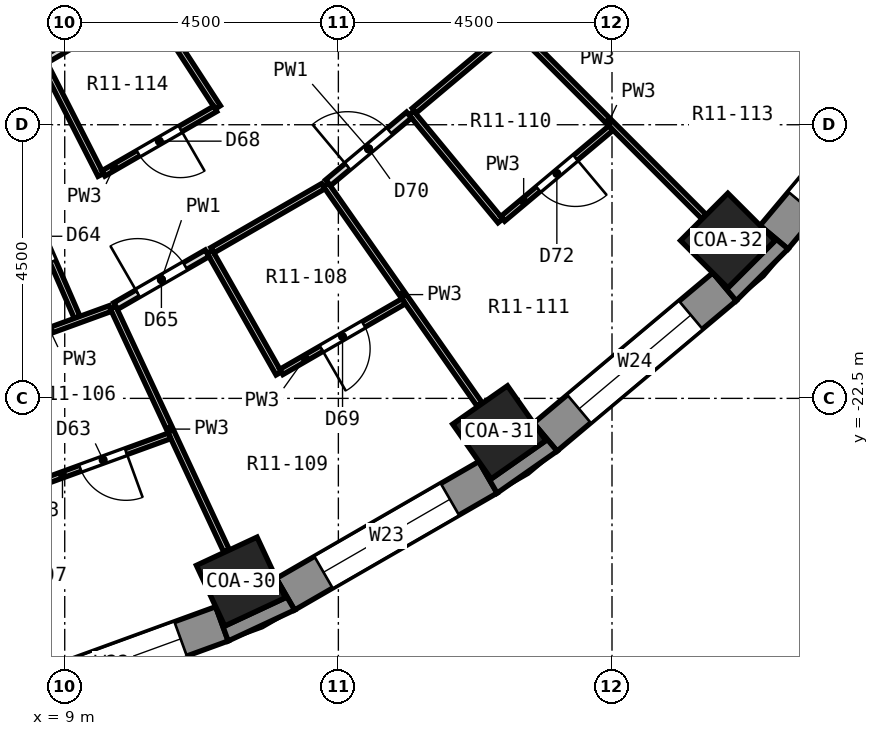
"""IFC4 building model, lengths in metres.
Left out: names, types, materials, properties, quantities, classifications, styles, units other than length and angle.
Written with IfcOpenShell. Run it as: python <this file> out.ifc"""

import sys

from ifc_helpers import new_model, si_unit, direction, frame, frame_2d, origin, origin_2d, place, context, subcontext, project, spatial, polyline, rectangle, outline, extrude, element, fill, save


model = new_model("IFC4")
c1 = context("Model", 3, precision=1e-05, world=origin(), true_north=direction((0.0, 1.0)))
c2 = subcontext(c1, "Body", "Model", "MODEL_VIEW")
j1 = project(units=[si_unit("LENGTHUNIT", "METRE"), si_unit("PLANEANGLEUNIT", "RADIAN")], contexts=[c1])
p1 = place(None, origin())
s1 = spatial("IfcSite", under=j1, at=p1, CompositionType="ELEMENT")
p2 = place(p1, origin())
s2 = spatial("IfcBuilding", under=s1, at=p2, CompositionType="ELEMENT")
p3 = place(p2, frame((0.0, 0.0, 46.1)))
s3 = spatial("IfcBuildingStorey", under=s2, at=p3, CompositionType="ELEMENT", Elevation=46.1)
for number, where, z_axis, x_axis in (
    (1, (11.897, -25.512, 0.0), (0.0, 0.0, 1.0), (0.423, -0.906, 0.0)),
    (2, (16.146, -23.059, 0.0), (0.0, 0.0, 1.0), (0.574, -0.819, 0.0)),
    (3, (19.905, -19.905, 0.0), (0.0, 0.0, 1.0), (0.707, -0.707, 0.0)),
):
    element("IfcColumn", number, at=place(p3, frame(where, z_axis=z_axis, x_axis=x_axis)), inside=s3, PredefinedType="COLUMN", context=c2, shape_type="SweptSolid", body=[
        extrude(rectangle(XDim=1.1, YDim=1.1, at=origin_2d()), origin(), (0.0, 0.0, 1.0), 3.3),
    ])
p4 = place(p3, frame((7.971, -27.523, 0.0), z_axis=(0.0, 0.0, 1.0), x_axis=(0.939689588564, 0.342028474173, 0.0)))
e4 = element("IfcWall", 4, at=p4, inside=s3, PredefinedType="SOLIDWALL", context=c2, shape_type="SweptSolid", body=[
    extrude(rectangle(XDim=3.846, YDim=0.6, at=frame_2d((1.923, 0.0))), origin(), (0.0, 0.0, 1.0), 2.75),
])
p5 = place(p4, frame((0.723, 0.0, 0.9)))
e5 = element("IfcOpeningElement", 5, at=p5, cuts=e4, PredefinedType="OPENING", context=c2, shape_type="SweptSolid", body=[
    extrude(rectangle(XDim=2.4, YDim=1.8, at=frame_2d((1.2, 0.9))), frame((0.0, 0.312, 0.0), z_axis=(0.0, -1.0, 0.0), x_axis=(1.0, 0.0, 0.0)), (0.0, 0.0, 1.0), 0.624),
])
p6 = place(p3, frame((12.63, -25.721, 0.0), z_axis=(0.0, 0.0, 1.0), x_axis=(0.86603124159, 0.499989888488, 0.0)))
e6 = element("IfcWall", 6, at=p6, inside=s3, PredefinedType="SOLIDWALL", context=c2, shape_type="SweptSolid", body=[
    extrude(rectangle(XDim=3.846, YDim=0.6, at=frame_2d((1.923, 0.0))), origin(), (0.0, 0.0, 1.0), 2.75),
])
p7 = place(p6, frame((0.723, 0.0, 0.9)))
e7 = element("IfcOpeningElement", 7, at=p7, cuts=e6, PredefinedType="OPENING", context=c2, shape_type="SweptSolid", body=[
    extrude(rectangle(XDim=2.4, YDim=1.8, at=frame_2d((1.2, 0.9))), frame((0.0, 0.312, 0.0), z_axis=(0.0, -1.0, 0.0), x_axis=(1.0, 0.0, 0.0)), (0.0, 0.0, 1.0), 0.624),
])
p8 = place(p3, frame((16.904, -23.137, 0.0), z_axis=(0.0, 0.0, 1.0), x_axis=(0.766026164483, 0.642809392687, 0.0)))
e8 = element("IfcWall", 8, at=p8, inside=s3, PredefinedType="SOLIDWALL", context=c2, shape_type="SweptSolid", body=[
    extrude(rectangle(XDim=3.846, YDim=0.6, at=frame_2d((1.923, 0.0))), origin(), (0.0, 0.0, 1.0), 2.75),
])
p9 = place(p8, frame((0.723, 0.0, 0.9)))
e9 = element("IfcOpeningElement", 9, at=p9, cuts=e8, PredefinedType="OPENING", context=c2, shape_type="SweptSolid", body=[
    extrude(rectangle(XDim=2.4, YDim=1.8, at=frame_2d((1.2, 0.9))), frame((0.0, 0.312, 0.0), z_axis=(0.0, -1.0, 0.0), x_axis=(1.0, 0.0, 0.0)), (0.0, 0.0, 1.0), 0.624),
])
p10 = place(p3, frame((20.665, -19.85, 0.0), z_axis=(0.0, 0.0, 1.0), x_axis=(0.642809392687, 0.766026164483, 0.0)))
e10 = element("IfcWall", 10, at=p10, inside=s3, PredefinedType="SOLIDWALL", context=c2, shape_type="SweptSolid", body=[
    extrude(rectangle(XDim=3.846, YDim=0.6, at=frame_2d((1.923, 0.0))), origin(), (0.0, 0.0, 1.0), 2.75),
])
p11 = place(p10, frame((0.723, 0.0, 0.9)))
e11 = element("IfcOpeningElement", 11, at=p11, cuts=e10, PredefinedType="OPENING", context=c2, shape_type="SweptSolid", body=[
    extrude(rectangle(XDim=2.4, YDim=1.8, at=frame_2d((1.2, 0.9))), frame((0.0, 0.312, 0.0), z_axis=(0.0, -1.0, 0.0), x_axis=(1.0, 0.0, 0.0)), (0.0, 0.0, 1.0), 0.624),
])
p12 = place(p3, origin())
e12 = element("IfcWall", 12, at=p12, inside=s3, PredefinedType="SOLIDWALL", context=c2, shape_type="SweptSolid", body=[
    extrude(outline(polyline([(12.78, -25.981), (12.479, -25.461), (12.628, -25.779), (11.631, -26.243), (11.483, -25.926), (11.688, -26.49), (12.78, -25.981)])), origin(), (0.0, 0.0, 1.0), 2.75),
])
p13 = place(p3, origin())
e13 = element("IfcWall", 13, at=p13, inside=s3, PredefinedType="SOLIDWALL", context=c2, shape_type="SweptSolid", body=[
    extrude(outline(polyline([(16.11, -24.058), (17.097, -23.367), (16.711, -22.907), (16.912, -23.194), (16.011, -23.825), (15.81, -23.538), (16.11, -24.058)])), origin(), (0.0, 0.0, 1.0), 2.75),
])
p14 = place(p3, origin())
e14 = element("IfcWall", 14, at=p14, inside=s3, PredefinedType="SOLIDWALL", context=c2, shape_type="SweptSolid", body=[
    extrude(outline(polyline([(20.895, -20.043), (20.435, -19.657), (20.683, -19.905), (19.905, -20.683), (19.657, -20.435), (20.043, -20.895), (20.895, -20.043)])), origin(), (0.0, 0.0, 1.0), 2.75),
])
p15 = place(p3, frame((7.65, -17.594, 0.0), z_axis=(0.0, 0.0, 1.0), x_axis=(0.398813158587, -0.917032204744, 0.0)))
e15 = element("IfcWall", 15, at=p15, inside=s3, PredefinedType="PARTITIONING", context=c2, shape_type="SweptSolid", body=[
    extrude(rectangle(XDim=3.897, YDim=0.1, at=frame_2d((1.948, 0.0))), origin(), (0.0, 0.0, 1.0), 2.75),
])
p16 = place(p15, frame((1.992, 0.0, 0.0)))
e16 = element("IfcOpeningElement", 16, at=p16, cuts=e15, PredefinedType="OPENING", context=c2, shape_type="SweptSolid", body=[
    extrude(rectangle(XDim=0.9, YDim=2.1, at=frame_2d((0.45, 1.05))), frame((0.0, 0.062, 0.0), z_axis=(0.0, -1.0, 0.0), x_axis=(1.0, 0.0, 0.0)), (0.0, 0.0, 1.0), 0.124),
])
p17 = place(p3, frame((9.795, -21.006, 0.0), z_axis=(0.0, 0.0, 1.0), x_axis=(0.422658280027, -0.906289125127, 0.0)))
e17 = element("IfcWall", 17, at=p17, inside=s3, PredefinedType="PARTITIONING", context=c2, shape_type="SweptSolid", body=[
    extrude(rectangle(XDim=4.413, YDim=0.1, at=frame_2d((2.206, 0.0))), origin(), (0.0, 0.0, 1.0), 2.75),
])
p18 = place(p3, frame((8.667, -17.008, 0.0), z_axis=(0.0, 0.0, 1.0), x_axis=(0.453664033068, -0.891172791944, 0.0)))
e18 = element("IfcWall", 18, at=p18, inside=s3, PredefinedType="PARTITIONING", context=c2, shape_type="SweptSolid", body=[
    extrude(rectangle(XDim=2.04, YDim=0.1, at=frame_2d((1.02, 0.0))), origin(), (0.0, 0.0, 1.0), 2.75),
])
p19 = place(p3, frame((11.385, -20.089, 0.0), z_axis=(0.0, 0.0, 1.0), x_axis=(0.49306078006, -0.869994866173, 0.0)))
e19 = element("IfcWall", 19, at=p19, inside=s3, PredefinedType="PARTITIONING", context=c2, shape_type="SweptSolid", body=[
    extrude(rectangle(XDim=2.3, YDim=0.1, at=frame_2d((1.15, 0.0))), origin(), (0.0, 0.0, 1.0), 2.75),
])
p20 = place(p3, frame((10.406, -16.003, 0.0), z_axis=(0.0, 0.0, 1.0), x_axis=(0.545026202076, -0.838419011623, 0.0)))
e20 = element("IfcWall", 20, at=p20, inside=s3, PredefinedType="PARTITIONING", context=c2, shape_type="SweptSolid", body=[
    extrude(rectangle(XDim=2.04, YDim=0.1, at=frame_2d((1.02, 0.0))), origin(), (0.0, 0.0, 1.0), 2.75),
])
p21 = place(p3, frame((13.294, -18.986, 0.0), z_axis=(0.0, 0.0, 1.0), x_axis=(0.573391786342, -0.819281306607, 0.0)))
e21 = element("IfcWall", 21, at=p21, inside=s3, PredefinedType="PARTITIONING", context=c2, shape_type="SweptSolid", body=[
    extrude(rectangle(XDim=4.412, YDim=0.1, at=frame_2d((2.206, 0.0))), origin(), (0.0, 0.0, 1.0), 2.75),
])
p22 = place(p3, frame((14.7, -17.807, 0.0), z_axis=(0.0, 0.0, 1.0), x_axis=(0.636700344293, -0.771111322428, 0.0)))
e22 = element("IfcWall", 22, at=p22, inside=s3, PredefinedType="PARTITIONING", context=c2, shape_type="SweptSolid", body=[
    extrude(rectangle(XDim=2.3, YDim=0.1, at=frame_2d((1.15, 0.0))), origin(), (0.0, 0.0, 1.0), 2.75),
])
p23 = place(p3, frame((16.389, -16.389, 0.0), z_axis=(0.0, 0.0, 1.0), x_axis=(0.707106781187, -0.707106781187, 0.0)))
e23 = element("IfcWall", 23, at=p23, inside=s3, PredefinedType="PARTITIONING", context=c2, shape_type="SweptSolid", body=[
    extrude(rectangle(XDim=4.413, YDim=0.1, at=frame_2d((2.206, 0.0))), origin(), (0.0, 0.0, 1.0), 2.75),
])
p24 = place(p3, frame((8.54, -23.911, 0.0), z_axis=(0.0, 0.0, 1.0), x_axis=(0.939716717369, 0.34195393125, 0.0)))
e24 = element("IfcWall", 24, at=p24, inside=s3, PredefinedType="PARTITIONING", context=c2, shape_type="SweptSolid", body=[
    extrude(rectangle(XDim=2.324, YDim=0.1, at=frame_2d((1.162, 0.0))), origin(), (0.0, 0.0, 1.0), 2.75),
])
p25 = place(p24, frame((0.762, 0.0, 0.0)))
e25 = element("IfcOpeningElement", 25, at=p25, cuts=e24, PredefinedType="OPENING", context=c2, shape_type="SweptSolid", body=[
    extrude(rectangle(XDim=0.8, YDim=2.1, at=frame_2d((0.4, 1.05))), frame((0.0, 0.062, 0.0), z_axis=(0.0, -1.0, 0.0), x_axis=(1.0, 0.0, 0.0)), (0.0, 0.0, 1.0), 0.124),
])
p26 = place(p3, frame((7.77, -21.743, 0.0), z_axis=(0.0, 0.0, 1.0), x_axis=(0.939725675468, 0.341929312674, 0.0)))
e26 = element("IfcWall", 26, at=p26, inside=s3, PredefinedType="PARTITIONING", context=c2, shape_type="SweptSolid", body=[
    extrude(rectangle(XDim=2.105, YDim=0.1, at=frame_2d((1.052, 0.0))), origin(), (0.0, 0.0, 1.0), 2.75),
])
p27 = place(p3, frame((12.562, -22.065, 0.0), z_axis=(0.0, 0.0, 1.0), x_axis=(0.865919666768, 0.50018309718, 0.0)))
e27 = element("IfcWall", 27, at=p27, inside=s3, PredefinedType="PARTITIONING", context=c2, shape_type="SweptSolid", body=[
    extrude(rectangle(XDim=2.324, YDim=0.1, at=frame_2d((1.162, 0.0))), origin(), (0.0, 0.0, 1.0), 2.75),
])
p28 = place(p27, frame((0.762, 0.0, 0.0)))
e28 = element("IfcOpeningElement", 28, at=p28, cuts=e27, PredefinedType="OPENING", context=c2, shape_type="SweptSolid", body=[
    extrude(rectangle(XDim=0.8, YDim=2.1, at=frame_2d((0.4, 1.05))), frame((0.0, 0.062, 0.0), z_axis=(0.0, -1.0, 0.0), x_axis=(1.0, 0.0, 0.0)), (0.0, 0.0, 1.0), 0.124),
])
p29 = place(p3, frame((11.428, -20.064, 0.0), z_axis=(0.0, 0.0, 1.0), x_axis=(0.865870655861, 0.50026793553, 0.0)))
e29 = element("IfcWall", 29, at=p29, inside=s3, PredefinedType="PARTITIONING", context=c2, shape_type="SweptSolid", body=[
    extrude(rectangle(XDim=2.105, YDim=0.1, at=frame_2d((1.052, 0.0))), origin(), (0.0, 0.0, 1.0), 2.75),
])
p30 = place(p3, frame((9.838, -20.981, 0.0), z_axis=(0.0, 0.0, 1.0), x_axis=(0.866288616225, 0.499543825303, 0.0)))
e30 = element("IfcWall", 30, at=p30, inside=s3, PredefinedType="PARTITIONING", context=c2, shape_type="SweptSolid", body=[
    extrude(rectangle(XDim=1.735, YDim=0.125, at=frame_2d((0.868, 0.0))), origin(), (0.0, 0.0, 1.0), 2.75),
])
p31 = place(p30, frame((0.418, 0.0, 0.0)))
e31 = element("IfcOpeningElement", 31, at=p31, cuts=e30, PredefinedType="OPENING", context=c2, shape_type="SweptSolid", body=[
    extrude(rectangle(XDim=0.9, YDim=2.1, at=frame_2d((0.45, 1.05))), frame((0.0, 0.074, 0.0), z_axis=(0.0, -1.0, 0.0), x_axis=(1.0, 0.0, 0.0)), (0.0, 0.0, 1.0), 0.149),
])
p32 = place(p3, frame((9.635, -18.801, 0.0), z_axis=(0.0, 0.0, 1.0), x_axis=(0.866013304951, 0.500020955208, 0.0)))
e32 = element("IfcWall", 32, at=p32, inside=s3, PredefinedType="PARTITIONING", context=c2, shape_type="SweptSolid", body=[
    extrude(rectangle(XDim=2.124, YDim=0.1, at=frame_2d((1.062, 0.0))), origin(), (0.0, 0.0, 1.0), 2.75),
])
p33 = place(p32, frame((0.662, 0.0, 0.0)))
e33 = element("IfcOpeningElement", 33, at=p33, cuts=e32, PredefinedType="OPENING", context=c2, shape_type="SweptSolid", body=[
    extrude(rectangle(XDim=0.8, YDim=2.1, at=frame_2d((0.4, 1.05))), frame((0.0, 0.062, 0.0), z_axis=(0.0, -1.0, 0.0), x_axis=(1.0, 0.0, 0.0)), (0.0, 0.0, 1.0), 0.124),
])
p34 = place(p3, frame((5.145, -18.969, 0.0), z_axis=(0.0, 0.0, 1.0), x_axis=(0.866035198373, 0.499983034892, 0.0)))
e34 = element("IfcWall", 34, at=p34, inside=s3, PredefinedType="PARTITIONING", context=c2, shape_type="SweptSolid", body=[
    extrude(rectangle(XDim=10.192, YDim=0.125, at=frame_2d((5.096, 0.0))), origin(), (0.0, 0.0, 1.0), 2.75),
])
p35 = place(p34, frame((7.577, 0.0, 0.0)))
e35 = element("IfcOpeningElement", 35, at=p35, cuts=e34, PredefinedType="OPENING", context=c2, shape_type="SweptSolid", body=[
    extrude(rectangle(XDim=1.0, YDim=2.1, at=frame_2d((0.5, 1.05))), frame((0.0, 0.074, 0.0), z_axis=(0.0, -1.0, 0.0), x_axis=(1.0, 0.0, 0.0)), (0.0, 0.0, 1.0), 0.149),
])
p36 = place(p3, frame((4.556, -16.769, 0.0), z_axis=(0.0, 0.0, 1.0), x_axis=(0.865979941794, 0.500078734211, 0.0)))
e36 = element("IfcWall", 36, at=p36, inside=s3, PredefinedType="PARTITIONING", context=c2, shape_type="SweptSolid", body=[
    extrude(rectangle(XDim=8.877, YDim=0.125, at=frame_2d((4.439, 0.0))), origin(), (0.0, 0.0, 1.0), 2.75),
])
p37 = place(p36, frame((3.989, 0.0, 0.0)))
e37 = element("IfcOpeningElement", 37, at=p37, cuts=e36, PredefinedType="OPENING", context=c2, shape_type="SweptSolid", body=[
    extrude(rectangle(XDim=0.9, YDim=2.1, at=frame_2d((0.45, 1.05))), frame((0.0, 0.074, 0.0), z_axis=(0.0, -1.0, 0.0), x_axis=(1.0, 0.0, 0.0)), (0.0, 0.0, 1.0), 0.149),
])
p38 = place(p3, frame((13.332, -18.953, 0.0), z_axis=(0.0, 0.0, 1.0), x_axis=(0.766881682313, 0.641788505143, 0.0)))
e38 = element("IfcWall", 38, at=p38, inside=s3, PredefinedType="PARTITIONING", context=c2, shape_type="SweptSolid", body=[
    extrude(rectangle(XDim=1.735, YDim=0.125, at=frame_2d((0.868, 0.0))), origin(), (0.0, 0.0, 1.0), 2.75),
])
p39 = place(p38, frame((0.417, 0.0, 0.0)))
e39 = element("IfcOpeningElement", 39, at=p39, cuts=e38, PredefinedType="OPENING", context=c2, shape_type="SweptSolid", body=[
    extrude(rectangle(XDim=0.9, YDim=2.1, at=frame_2d((0.45, 1.05))), frame((0.0, 0.074, 0.0), z_axis=(0.0, -1.0, 0.0), x_axis=(1.0, 0.0, 0.0)), (0.0, 0.0, 1.0), 0.149),
])
p40 = place(p3, frame((16.202, -19.548, 0.0), z_axis=(0.0, 0.0, 1.0), x_axis=(0.766254925891, 0.642536682648, 0.0)))
e40 = element("IfcWall", 40, at=p40, inside=s3, PredefinedType="PARTITIONING", context=c2, shape_type="SweptSolid", body=[
    extrude(rectangle(XDim=2.325, YDim=0.1, at=frame_2d((1.162, 0.0))), origin(), (0.0, 0.0, 1.0), 2.75),
])
p41 = place(p40, frame((0.762, 0.0, 0.0)))
e41 = element("IfcOpeningElement", 41, at=p41, cuts=e40, PredefinedType="OPENING", context=c2, shape_type="SweptSolid", body=[
    extrude(rectangle(XDim=0.8, YDim=2.1, at=frame_2d((0.4, 1.05))), frame((0.0, 0.062, 0.0), z_axis=(0.0, -1.0, 0.0), x_axis=(1.0, 0.0, 0.0)), (0.0, 0.0, 1.0), 0.124),
])
p42 = place(p3, frame((14.748, -17.767, 0.0), z_axis=(0.0, 0.0, 1.0), x_axis=(0.765854222204, 0.643014238048, 0.0)))
e42 = element("IfcWall", 42, at=p42, inside=s3, PredefinedType="PARTITIONING", context=c2, shape_type="SweptSolid", body=[
    extrude(rectangle(XDim=2.093, YDim=0.1, at=frame_2d((1.046, 0.0))), origin(), (0.0, 0.0, 1.0), 2.75),
])
p43 = place(p5, origin())
e43 = element("IfcWindow", 43, at=p43, inside=s3, PartitioningType="SINGLE_PANEL", PredefinedType="WINDOW", context=c2, shape_type="SweptSolid", body=[
    extrude(rectangle(XDim=2.4, YDim=1.8, at=frame_2d((1.2, 0.9))), frame((0.0, 0.18, 0.0), z_axis=(0.0, -1.0, 0.0), x_axis=(1.0, 0.0, 0.0)), (0.0, 0.0, 1.0), 0.06),
])
fill(e5, e43)
p44 = place(p7, origin())
e44 = element("IfcWindow", 44, at=p44, inside=s3, PartitioningType="SINGLE_PANEL", PredefinedType="WINDOW", context=c2, shape_type="SweptSolid", body=[
    extrude(rectangle(XDim=2.4, YDim=1.8, at=frame_2d((1.2, 0.9))), frame((0.0, 0.18, 0.0), z_axis=(0.0, -1.0, 0.0), x_axis=(1.0, 0.0, 0.0)), (0.0, 0.0, 1.0), 0.06),
])
fill(e7, e44)
p45 = place(p9, origin())
e45 = element("IfcWindow", 45, at=p45, inside=s3, PartitioningType="SINGLE_PANEL", PredefinedType="WINDOW", context=c2, shape_type="SweptSolid", body=[
    extrude(rectangle(XDim=2.4, YDim=1.8, at=frame_2d((1.2, 0.9))), frame((0.0, 0.18, 0.0), z_axis=(0.0, -1.0, 0.0), x_axis=(1.0, 0.0, 0.0)), (0.0, 0.0, 1.0), 0.06),
])
fill(e9, e45)
p46 = place(p11, origin())
e46 = element("IfcWindow", 46, at=p46, inside=s3, PartitioningType="SINGLE_PANEL", PredefinedType="WINDOW", context=c2, shape_type="SweptSolid", body=[
    extrude(rectangle(XDim=2.4, YDim=1.8, at=frame_2d((1.2, 0.9))), frame((0.0, 0.18, 0.0), z_axis=(0.0, -1.0, 0.0), x_axis=(1.0, 0.0, 0.0)), (0.0, 0.0, 1.0), 0.06),
])
fill(e11, e46)
p47 = place(p25, frame((0.8, 0.0, 0.0), z_axis=(0.0, 0.0, 1.0), x_axis=(-1.0, 0.0, 0.0)))
e47 = element("IfcDoor", 47, at=p47, inside=s3, OperationType="SINGLE_SWING_LEFT", PredefinedType="DOOR", context=c2, shape_type="SweptSolid", body=[
    extrude(rectangle(XDim=0.8, YDim=2.1, at=frame_2d((0.4, 1.05))), frame((0.0, 0.025, 0.0), z_axis=(0.0, -1.0, 0.0), x_axis=(1.0, 0.0, 0.0)), (0.0, 0.0, 1.0), 0.05),
])
fill(e25, e47)
p48 = place(p16, frame((0.9, 0.0, 0.0), z_axis=(0.0, 0.0, 1.0), x_axis=(-1.0, 0.0, 0.0)))
e48 = element("IfcDoor", 48, at=p48, inside=s3, OperationType="SINGLE_SWING_LEFT", PredefinedType="DOOR", context=c2, shape_type="SweptSolid", body=[
    extrude(rectangle(XDim=0.9, YDim=2.1, at=frame_2d((0.45, 1.05))), frame((0.0, 0.025, 0.0), z_axis=(0.0, -1.0, 0.0), x_axis=(1.0, 0.0, 0.0)), (0.0, 0.0, 1.0), 0.05),
])
fill(e16, e48)
p49 = place(p31, origin())
e49 = element("IfcDoor", 49, at=p49, inside=s3, OperationType="SINGLE_SWING_LEFT", PredefinedType="DOOR", context=c2, shape_type="SweptSolid", body=[
    extrude(rectangle(XDim=0.9, YDim=2.1, at=frame_2d((0.45, 1.05))), frame((0.0, 0.025, 0.0), z_axis=(0.0, -1.0, 0.0), x_axis=(1.0, 0.0, 0.0)), (0.0, 0.0, 1.0), 0.05),
])
fill(e31, e49)
p50 = place(p33, frame((0.8, 0.0, 0.0), z_axis=(0.0, 0.0, 1.0), x_axis=(-1.0, 0.0, 0.0)))
e50 = element("IfcDoor", 50, at=p50, inside=s3, OperationType="SINGLE_SWING_LEFT", PredefinedType="DOOR", context=c2, shape_type="SweptSolid", body=[
    extrude(rectangle(XDim=0.8, YDim=2.1, at=frame_2d((0.4, 1.05))), frame((0.0, 0.025, 0.0), z_axis=(0.0, -1.0, 0.0), x_axis=(1.0, 0.0, 0.0)), (0.0, 0.0, 1.0), 0.05),
])
fill(e33, e50)
p51 = place(p28, frame((0.8, 0.0, 0.0), z_axis=(0.0, 0.0, 1.0), x_axis=(-1.0, 0.0, 0.0)))
e51 = element("IfcDoor", 51, at=p51, inside=s3, OperationType="SINGLE_SWING_RIGHT", PredefinedType="DOOR", context=c2, shape_type="SweptSolid", body=[
    extrude(rectangle(XDim=0.8, YDim=2.1, at=frame_2d((0.4, 1.05))), frame((0.0, 0.025, 0.0), z_axis=(0.0, -1.0, 0.0), x_axis=(1.0, 0.0, 0.0)), (0.0, 0.0, 1.0), 0.05),
])
fill(e28, e51)
p52 = place(p39, origin())
e52 = element("IfcDoor", 52, at=p52, inside=s3, OperationType="SINGLE_SWING_LEFT", PredefinedType="DOOR", context=c2, shape_type="SweptSolid", body=[
    extrude(rectangle(XDim=0.9, YDim=2.1, at=frame_2d((0.45, 1.05))), frame((0.0, 0.025, 0.0), z_axis=(0.0, -1.0, 0.0), x_axis=(1.0, 0.0, 0.0)), (0.0, 0.0, 1.0), 0.05),
])
fill(e39, e52)
p53 = place(p41, frame((0.8, 0.0, 0.0), z_axis=(0.0, 0.0, 1.0), x_axis=(-1.0, 0.0, 0.0)))
e53 = element("IfcDoor", 53, at=p53, inside=s3, OperationType="SINGLE_SWING_LEFT", PredefinedType="DOOR", context=c2, shape_type="SweptSolid", body=[
    extrude(rectangle(XDim=0.8, YDim=2.1, at=frame_2d((0.4, 1.05))), frame((0.0, 0.025, 0.0), z_axis=(0.0, -1.0, 0.0), x_axis=(1.0, 0.0, 0.0)), (0.0, 0.0, 1.0), 0.05),
])
fill(e41, e53)
save(model, sys.argv[1])
